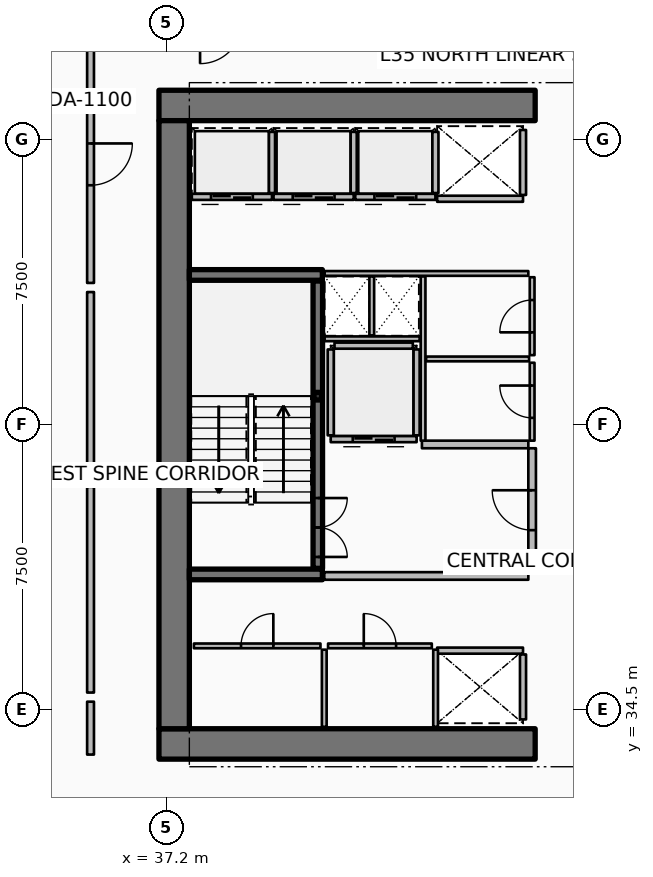
"""IFC4 building model, lengths in metres.
Left out: names, types, materials, properties, quantities, classifications, styles, units other than length and angle.
Written with IfcOpenShell. Run it as: python <this file> out.ifc"""

import sys

from ifc_helpers import new_model, si_unit, direction, frame, frame_2d, origin, origin_2d, place, context, subcontext, project, spatial, rectangle, hollow_rectangle, extrude, element, fill, save


model = new_model("IFC4")
c1 = context("Model", 3, precision=1e-05, world=origin(), true_north=direction((0.0, 1.0)))
c2 = subcontext(c1, "Body", "Model", "MODEL_VIEW")
j1 = project(units=[si_unit("LENGTHUNIT", "METRE"), si_unit("PLANEANGLEUNIT", "RADIAN")], contexts=[c1])
p1 = place(None, origin())
s1 = spatial("IfcSite", under=j1, at=p1, CompositionType="ELEMENT")
p2 = place(p1, origin())
s2 = spatial("IfcBuilding", under=s1, at=p2, CompositionType="ELEMENT")
p3 = place(p2, frame((0.0, 0.0, 142.8)))
s3 = spatial("IfcBuildingStorey", under=s2, at=p3, CompositionType="ELEMENT", Elevation=142.8)
for number, where, z_axis, x_axis in (
    (1, (37.0, 33.6, 0.0), (0.0, 0.0, 1.0), (1.0, 0.0, 0.0)),
    (2, (37.0, 50.4, 0.0), (0.0, 0.0, 1.0), (1.0, 0.0, 0.0)),
):
    element("IfcWall", number, at=place(p3, frame(where, z_axis=z_axis, x_axis=x_axis)), inside=s3, PredefinedType="SHEAR", context=c2, shape_type="SweptSolid", body=[
        extrude(rectangle(XDim=9.9, YDim=0.8, at=frame_2d((4.95, 0.0))), origin(), (0.0, 0.0, 1.0), 3.75),
    ])
p4 = place(p3, frame((37.4, 34.0, 0.0), z_axis=(0.0, 0.0, 1.0), x_axis=(0.0, 1.0, 0.0)))
e3 = element("IfcWall", 3, at=p4, inside=s3, PredefinedType="SHEAR", context=c2, shape_type="SweptSolid", body=[
    extrude(rectangle(XDim=16.0, YDim=0.8, at=frame_2d((8.0, 0.0))), origin(), (0.0, 0.0, 1.0), 3.75),
])
for number, where, z_axis, x_axis in (
    (4, (37.8, 38.06, 0.0), (0.0, 0.0, 1.0), (1.0, 0.0, 0.0)),
    (5, (37.8, 45.94, 0.0), (0.0, 0.0, 1.0), (1.0, 0.0, 0.0)),
):
    element("IfcWall", number, at=place(p3, frame(where, z_axis=z_axis, x_axis=x_axis)), inside=s3, PredefinedType="SHEAR", context=c2, shape_type="SweptSolid", body=[
        extrude(rectangle(XDim=3.5, YDim=0.28, at=frame_2d((1.75, 0.0))), origin(), (0.0, 0.0, 1.0), 3.75),
    ])
p5 = place(p3, frame((41.18, 42.75, 0.0), z_axis=(0.0, 0.0, 1.0), x_axis=(1.0, 0.0, 0.0)))
e6 = element("IfcColumn", 6, at=p5, inside=s3, PredefinedType="COLUMN", context=c2, shape_type="SweptSolid", body=[
    extrude(hollow_rectangle(XDim=0.2, YDim=0.2, WallThickness=0.01, InnerFilletRadius=0.01, OuterFilletRadius=0.02, at=origin_2d()), origin(), (0.0, 0.0, 1.0), 1.67),
])
p6 = place(p3, frame((41.18, 38.22, 0.0), z_axis=(0.0, 0.0, 1.0), x_axis=(0.0, 1.0, 0.0)))
e7 = element("IfcWall", 7, at=p6, inside=s3, PredefinedType="SOLIDWALL", context=c2, shape_type="SweptSolid", body=[
    extrude(rectangle(XDim=7.56, YDim=0.25, at=frame_2d((3.78, 0.0))), origin(), (0.0, 0.0, 1.0), 3.5),
])
p7 = place(p6, frame((0.3, 0.0, 0.0)))
e8 = element("IfcOpeningElement", 8, at=p7, cuts=e7, PredefinedType="OPENING", context=c2, shape_type="SweptSolid", body=[
    extrude(rectangle(XDim=1.55, YDim=2.15, at=frame_2d((0.775, 1.075))), frame((0.0, 0.135, 0.0), z_axis=(0.0, -1.0, 0.0), x_axis=(1.0, 0.0, 0.0)), (0.0, 0.0, 1.0), 0.27),
])
p8 = place(p3, frame((39.975, 47.995, 0.0), z_axis=(0.0, 0.0, 1.0), x_axis=(-1.0, 0.0, 0.0)))
e9 = element("IfcWall", 9, at=p8, inside=s3, PredefinedType="PARTITIONING", context=c2, shape_type="SweptSolid", body=[
    extrude(rectangle(XDim=2.11, YDim=0.16, at=frame_2d((1.055, 0.0))), origin(), (0.0, 0.0, 1.0), 3.5),
])
p9 = place(p8, frame((0.505, 0.0, 0.0)))
e10 = element("IfcOpeningElement", 10, at=p9, cuts=e9, PredefinedType="OPENING", context=c2, shape_type="SweptSolid", body=[
    extrude(rectangle(XDim=1.1, YDim=2.1, at=frame_2d((0.55, 1.05))), frame((0.0, 0.09, 0.0), z_axis=(0.0, -1.0, 0.0), x_axis=(1.0, 0.0, 0.0)), (0.0, 0.0, 1.0), 0.18),
])
p10 = place(p3, frame((39.975, 48.095, 0.0), z_axis=(0.0, 0.0, 1.0), x_axis=(0.0, 1.0, 0.0)))
e11 = element("IfcWall", 11, at=p10, inside=s3, PredefinedType="PARTITIONING", context=c2, shape_type="SweptSolid", body=[
    extrude(rectangle(XDim=1.61, YDim=0.16, at=frame_2d((0.805, 0.0))), origin(), (0.0, 0.0, 1.0), 3.5),
])
p11 = place(p3, frame((42.125, 47.995, 0.0), z_axis=(0.0, 0.0, 1.0), x_axis=(-1.0, 0.0, 0.0)))
e12 = element("IfcWall", 12, at=p11, inside=s3, PredefinedType="PARTITIONING", context=c2, shape_type="SweptSolid", body=[
    extrude(rectangle(XDim=2.11, YDim=0.16, at=frame_2d((1.055, 0.0))), origin(), (0.0, 0.0, 1.0), 3.5),
])
p12 = place(p11, frame((0.505, 0.0, 0.0)))
e13 = element("IfcOpeningElement", 13, at=p12, cuts=e12, PredefinedType="OPENING", context=c2, shape_type="SweptSolid", body=[
    extrude(rectangle(XDim=1.1, YDim=2.1, at=frame_2d((0.55, 1.05))), frame((0.0, 0.09, 0.0), z_axis=(0.0, -1.0, 0.0), x_axis=(1.0, 0.0, 0.0)), (0.0, 0.0, 1.0), 0.18),
])
p13 = place(p3, frame((42.125, 48.095, 0.0), z_axis=(0.0, 0.0, 1.0), x_axis=(0.0, 1.0, 0.0)))
e14 = element("IfcWall", 14, at=p13, inside=s3, PredefinedType="PARTITIONING", context=c2, shape_type="SweptSolid", body=[
    extrude(rectangle(XDim=1.61, YDim=0.16, at=frame_2d((0.805, 0.0))), origin(), (0.0, 0.0, 1.0), 3.5),
])
p14 = place(p3, frame((44.275, 47.995, 0.0), z_axis=(0.0, 0.0, 1.0), x_axis=(-1.0, 0.0, 0.0)))
e15 = element("IfcWall", 15, at=p14, inside=s3, PredefinedType="PARTITIONING", context=c2, shape_type="SweptSolid", body=[
    extrude(rectangle(XDim=2.11, YDim=0.16, at=frame_2d((1.055, 0.0))), origin(), (0.0, 0.0, 1.0), 3.5),
])
p15 = place(p14, frame((0.505, 0.0, 0.0)))
e16 = element("IfcOpeningElement", 16, at=p15, cuts=e15, PredefinedType="OPENING", context=c2, shape_type="SweptSolid", body=[
    extrude(rectangle(XDim=1.1, YDim=2.1, at=frame_2d((0.55, 1.05))), frame((0.0, 0.09, 0.0), z_axis=(0.0, -1.0, 0.0), x_axis=(1.0, 0.0, 0.0)), (0.0, 0.0, 1.0), 0.18),
])
p16 = place(p3, frame((44.275, 48.095, 0.0), z_axis=(0.0, 0.0, 1.0), x_axis=(0.0, 1.0, 0.0)))
e17 = element("IfcWall", 17, at=p16, inside=s3, PredefinedType="PARTITIONING", context=c2, shape_type="SweptSolid", body=[
    extrude(rectangle(XDim=1.61, YDim=0.16, at=frame_2d((0.805, 0.0))), origin(), (0.0, 0.0, 1.0), 3.5),
])
p17 = place(p3, frame((46.58, 47.945, 0.0), z_axis=(0.0, 0.0, 1.0), x_axis=(-1.0, 0.0, 0.0)))
e18 = element("IfcWall", 18, at=p17, inside=s3, PredefinedType="PARTITIONING", context=c2, shape_type="SweptSolid", body=[
    extrude(rectangle(XDim=2.26, YDim=0.16, at=frame_2d((1.13, 0.0))), origin(), (0.0, 0.0, 1.0), 3.5),
])
p18 = place(p3, frame((46.58, 48.045, 0.0), z_axis=(0.0, 0.0, 1.0), x_axis=(0.0, 1.0, 0.0)))
e19 = element("IfcWall", 19, at=p18, inside=s3, PredefinedType="PARTITIONING", context=c2, shape_type="SweptSolid", body=[
    extrude(rectangle(XDim=1.71, YDim=0.16, at=frame_2d((0.855, 0.0))), origin(), (0.0, 0.0, 1.0), 3.5),
])
p19 = place(p3, frame((44.32, 36.055, 0.0), z_axis=(0.0, 0.0, 1.0), x_axis=(1.0, 0.0, 0.0)))
e20 = element("IfcWall", 20, at=p19, inside=s3, PredefinedType="PARTITIONING", context=c2, shape_type="SweptSolid", body=[
    extrude(rectangle(XDim=2.26, YDim=0.16, at=frame_2d((1.13, 0.0))), origin(), (0.0, 0.0, 1.0), 3.5),
])
p20 = place(p3, frame((46.58, 34.245, 0.0), z_axis=(0.0, 0.0, 1.0), x_axis=(0.0, 1.0, 0.0)))
e21 = element("IfcWall", 21, at=p20, inside=s3, PredefinedType="PARTITIONING", context=c2, shape_type="SweptSolid", body=[
    extrude(rectangle(XDim=1.71, YDim=0.16, at=frame_2d((0.855, 0.0))), origin(), (0.0, 0.0, 1.0), 3.5),
])
p21 = place(p3, frame((43.78, 41.62, 0.0), z_axis=(0.0, 0.0, 1.0), x_axis=(-1.0, 0.0, 0.0)))
e22 = element("IfcWall", 22, at=p21, inside=s3, PredefinedType="PARTITIONING", context=c2, shape_type="SweptSolid", body=[
    extrude(rectangle(XDim=2.26, YDim=0.16, at=frame_2d((1.13, 0.0))), origin(), (0.0, 0.0, 1.0), 3.5),
])
p22 = place(p21, frame((0.58, 0.0, 0.0)))
e23 = element("IfcOpeningElement", 23, at=p22, cuts=e22, PredefinedType="OPENING", context=c2, shape_type="SweptSolid", body=[
    extrude(rectangle(XDim=1.1, YDim=2.1, at=frame_2d((0.55, 1.05))), frame((0.0, 0.09, 0.0), z_axis=(0.0, -1.0, 0.0), x_axis=(1.0, 0.0, 0.0)), (0.0, 0.0, 1.0), 0.18),
])
for number, where, z_axis, x_axis in (
    (24, (43.78, 41.72, 0.0), (0.0, 0.0, 1.0), (0.0, 1.0, 0.0)),
    (25, (41.52, 41.72, 0.0), (0.0, 0.0, 1.0), (0.0, 1.0, 0.0)),
):
    element("IfcWall", number, at=place(p3, frame(where, z_axis=z_axis, x_axis=x_axis)), inside=s3, PredefinedType="PARTITIONING", context=c2, shape_type="SweptSolid", body=[
        extrude(rectangle(XDim=2.26, YDim=0.16, at=frame_2d((1.13, 0.0))), origin(), (0.0, 0.0, 1.0), 3.5),
    ])
p23 = place(p3, frame((41.62, 44.08, 0.0), z_axis=(0.0, 0.0, 1.0), x_axis=(1.0, 0.0, 0.0)))
e26 = element("IfcWall", 26, at=p23, inside=s3, PredefinedType="PARTITIONING", context=c2, shape_type="SweptSolid", body=[
    extrude(rectangle(XDim=2.06, YDim=0.16, at=frame_2d((1.03, 0.0))), origin(), (0.0, 0.0, 1.0), 3.5),
])
for number, where, z_axis, x_axis in (
    (27, (44.28, 34.05, 0.0), (0.0, 0.0, 1.0), (0.0, 1.0, 0.0)),
    (28, (41.35, 34.05, 0.0), (0.0, 0.0, 1.0), (0.0, 1.0, 0.0)),
):
    element("IfcWall", number, at=place(p3, frame(where, z_axis=z_axis, x_axis=x_axis)), inside=s3, PredefinedType="PARTITIONING", context=c2, shape_type="SweptSolid", body=[
        extrude(rectangle(XDim=2.03, YDim=0.125, at=frame_2d((1.015, 0.0))), origin(), (0.0, 0.0, 1.0), 2.94),
    ])
p24 = place(p3, frame((37.92, 36.18, 0.0), z_axis=(0.0, 0.0, 1.0), x_axis=(1.0, 0.0, 0.0)))
e29 = element("IfcWall", 29, at=p24, inside=s3, PredefinedType="PARTITIONING", context=c2, shape_type="SweptSolid", body=[
    extrude(rectangle(XDim=3.33, YDim=0.125, at=frame_2d((1.665, 0.0))), origin(), (0.0, 0.0, 1.0), 2.94),
])
p25 = place(p24, frame((1.24, 0.0, 0.0)))
e30 = element("IfcOpeningElement", 30, at=p25, cuts=e29, PredefinedType="OPENING", context=c2, shape_type="SweptSolid", body=[
    extrude(rectangle(XDim=0.85, YDim=2.06, at=frame_2d((0.425, 1.03))), frame((0.0, 0.073, 0.0), z_axis=(0.0, -1.0, 0.0), x_axis=(1.0, 0.0, 0.0)), (0.0, 0.0, 1.0), 0.145),
])
p26 = place(p3, frame((41.45, 36.18, 0.0), z_axis=(0.0, 0.0, 1.0), x_axis=(1.0, 0.0, 0.0)))
e31 = element("IfcWall", 31, at=p26, inside=s3, PredefinedType="PARTITIONING", context=c2, shape_type="SweptSolid", body=[
    extrude(rectangle(XDim=2.73, YDim=0.125, at=frame_2d((1.365, 0.0))), origin(), (0.0, 0.0, 1.0), 2.94),
])
p27 = place(p26, frame((0.94, 0.0, 0.0)))
e32 = element("IfcOpeningElement", 32, at=p27, cuts=e31, PredefinedType="OPENING", context=c2, shape_type="SweptSolid", body=[
    extrude(rectangle(XDim=0.85, YDim=2.06, at=frame_2d((0.425, 1.03))), frame((0.0, 0.073, 0.0), z_axis=(0.0, -1.0, 0.0), x_axis=(1.0, 0.0, 0.0)), (0.0, 0.0, 1.0), 0.145),
])
p28 = place(p3, frame((41.35, 38.02, 0.0), z_axis=(0.0, 0.0, 1.0), x_axis=(1.0, 0.0, 0.0)))
e33 = element("IfcWall", 33, at=p28, inside=s3, PredefinedType="PARTITIONING", context=c2, shape_type="SweptSolid", body=[
    extrude(rectangle(XDim=5.37, YDim=0.2, at=frame_2d((2.685, 0.0))), origin(), (0.0, 0.0, 1.0), 3.5),
])
p29 = place(p3, frame((43.92, 41.48, 0.0), z_axis=(0.0, 0.0, 1.0), x_axis=(1.0, 0.0, 0.0)))
e34 = element("IfcWall", 34, at=p29, inside=s3, PredefinedType="PARTITIONING", context=c2, shape_type="SweptSolid", body=[
    extrude(rectangle(XDim=2.8, YDim=0.2, at=frame_2d((1.4, 0.0))), origin(), (0.0, 0.0, 1.0), 3.5),
])
p30 = place(p3, frame((46.82, 38.12, 0.0), z_axis=(0.0, 0.0, 1.0), x_axis=(0.0, 1.0, 0.0)))
e35 = element("IfcWall", 35, at=p30, inside=s3, PredefinedType="PARTITIONING", context=c2, shape_type="SweptSolid", body=[
    extrude(rectangle(XDim=3.26, YDim=0.2, at=frame_2d((1.63, 0.0))), origin(), (0.0, 0.0, 1.0), 3.5),
])
p31 = place(p30, frame((1.105, 0.0, 0.0)))
e36 = element("IfcOpeningElement", 36, at=p31, cuts=e35, PredefinedType="OPENING", context=c2, shape_type="SweptSolid", body=[
    extrude(rectangle(XDim=1.05, YDim=2.1, at=frame_2d((0.525, 1.05))), frame((0.0, 0.11, 0.0), z_axis=(0.0, -1.0, 0.0), x_axis=(1.0, 0.0, 0.0)), (0.0, 0.0, 1.0), 0.22),
])
p32 = place(p3, frame((41.36, 45.98, 0.0), z_axis=(0.0, 0.0, 1.0), x_axis=(1.0, 0.0, 0.0)))
e37 = element("IfcWall", 37, at=p32, inside=s3, PredefinedType="PARTITIONING", context=c2, shape_type="SweptSolid", body=[
    extrude(rectangle(XDim=5.36, YDim=0.125, at=frame_2d((2.68, 0.0))), origin(), (0.0, 0.0, 1.0), 2.94),
])
p33 = place(p3, frame((41.36, 44.26, 0.0), z_axis=(0.0, 0.0, 1.0), x_axis=(1.0, 0.0, 0.0)))
e38 = element("IfcWall", 38, at=p33, inside=s3, PredefinedType="PARTITIONING", context=c2, shape_type="SweptSolid", body=[
    extrude(rectangle(XDim=2.5, YDim=0.125, at=frame_2d((1.25, 0.0))), origin(), (0.0, 0.0, 1.0), 2.94),
])
p34 = place(p3, frame((42.6, 44.35, 0.0), z_axis=(0.0, 0.0, 1.0), x_axis=(0.0, 1.0, 0.0)))
e39 = element("IfcWall", 39, at=p34, inside=s3, PredefinedType="PARTITIONING", context=c2, shape_type="SweptSolid", body=[
    extrude(rectangle(XDim=1.55, YDim=0.125, at=frame_2d((0.775, 0.0))), origin(), (0.0, 0.0, 1.0), 2.94),
])
p35 = place(p3, frame((43.95, 41.58, 0.0), z_axis=(0.0, 0.0, 1.0), x_axis=(0.0, 1.0, 0.0)))
e40 = element("IfcWall", 40, at=p35, inside=s3, PredefinedType="PARTITIONING", context=c2, shape_type="SweptSolid", body=[
    extrude(rectangle(XDim=4.32, YDim=0.125, at=frame_2d((2.16, 0.0))), origin(), (0.0, 0.0, 1.0), 2.94),
])
p36 = place(p3, frame((44.03, 43.73, 0.0), z_axis=(0.0, 0.0, 1.0), x_axis=(1.0, 0.0, 0.0)))
e41 = element("IfcWall", 41, at=p36, inside=s3, PredefinedType="PARTITIONING", context=c2, shape_type="SweptSolid", body=[
    extrude(rectangle(XDim=2.71, YDim=0.125, at=frame_2d((1.355, 0.0))), origin(), (0.0, 0.0, 1.0), 2.94),
])
p37 = place(p3, frame((46.82, 41.58, 0.0), z_axis=(0.0, 0.0, 1.0), x_axis=(0.0, 1.0, 0.0)))
e42 = element("IfcWall", 42, at=p37, inside=s3, PredefinedType="PARTITIONING", context=c2, shape_type="SweptSolid", body=[
    extrude(rectangle(XDim=2.05, YDim=0.125, at=frame_2d((1.025, 0.0))), origin(), (0.0, 0.0, 1.0), 2.94),
])
p38 = place(p37, frame((0.6, 0.0, 0.0)))
e43 = element("IfcOpeningElement", 43, at=p38, cuts=e42, PredefinedType="OPENING", context=c2, shape_type="SweptSolid", body=[
    extrude(rectangle(XDim=0.85, YDim=2.06, at=frame_2d((0.425, 1.03))), frame((0.0, 0.073, 0.0), z_axis=(0.0, -1.0, 0.0), x_axis=(1.0, 0.0, 0.0)), (0.0, 0.0, 1.0), 0.145),
])
p39 = place(p3, frame((46.82, 43.83, 0.0), z_axis=(0.0, 0.0, 1.0), x_axis=(0.0, 1.0, 0.0)))
e44 = element("IfcWall", 44, at=p39, inside=s3, PredefinedType="PARTITIONING", context=c2, shape_type="SweptSolid", body=[
    extrude(rectangle(XDim=2.05, YDim=0.125, at=frame_2d((1.025, 0.0))), origin(), (0.0, 0.0, 1.0), 2.94),
])
p40 = place(p39, frame((0.6, 0.0, 0.0)))
e45 = element("IfcOpeningElement", 45, at=p40, cuts=e44, PredefinedType="OPENING", context=c2, shape_type="SweptSolid", body=[
    extrude(rectangle(XDim=0.85, YDim=2.06, at=frame_2d((0.425, 1.03))), frame((0.0, 0.073, 0.0), z_axis=(0.0, -1.0, 0.0), x_axis=(1.0, 0.0, 0.0)), (0.0, 0.0, 1.0), 0.145),
])
p41 = place(p3, frame((35.2, 51.971, 0.0), z_axis=(0.0, 0.0, 1.0), x_axis=(0.0, -1.0, 0.0)))
e46 = element("IfcWall", 46, at=p41, inside=s3, PredefinedType="PARTITIONING", context=c2, shape_type="SweptSolid", body=[
    extrude(rectangle(XDim=6.241, YDim=0.18, at=frame_2d((3.12, 0.0))), origin(), (0.0, 0.0, 1.0), 2.94),
])
p42 = place(p41, frame((2.57, 0.0, 0.0)))
e47 = element("IfcOpeningElement", 47, at=p42, cuts=e46, PredefinedType="OPENING", context=c2, shape_type="SweptSolid", body=[
    extrude(rectangle(XDim=1.1, YDim=2.1, at=frame_2d((0.55, 1.05))), frame((0.0, 0.1, 0.0), z_axis=(0.0, -1.0, 0.0), x_axis=(1.0, 0.0, 0.0)), (0.0, 0.0, 1.0), 0.2),
])
p43 = place(p3, frame((35.2, 45.49, 0.0), z_axis=(0.0, 0.0, 1.0), x_axis=(0.0, -1.0, 0.0)))
e48 = element("IfcWall", 48, at=p43, inside=s3, PredefinedType="PARTITIONING", context=c2, shape_type="SweptSolid", body=[
    extrude(rectangle(XDim=4.885, YDim=0.18, at=frame_2d((2.442, 0.0))), origin(), (0.0, 0.0, 1.0), 2.94),
])
p44 = place(p3, frame((35.2, 40.365, 0.0), z_axis=(0.0, 0.0, 1.0), x_axis=(0.0, -1.0, 0.0)))
e49 = element("IfcWall", 49, at=p44, inside=s3, PredefinedType="PARTITIONING", context=c2, shape_type="SweptSolid", body=[
    extrude(rectangle(XDim=5.413, YDim=0.18, at=frame_2d((2.707, 0.0))), origin(), (0.0, 0.0, 1.0), 2.94),
])
p45 = place(p3, frame((35.2, 34.712, 0.0), z_axis=(0.0, 0.0, 1.0), x_axis=(0.0, -1.0, 0.0)))
e50 = element("IfcWall", 50, at=p45, inside=s3, PredefinedType="PARTITIONING", context=c2, shape_type="SweptSolid", body=[
    extrude(rectangle(XDim=1.392, YDim=0.18, at=frame_2d((0.696, 0.0))), origin(), (0.0, 0.0, 1.0), 2.94),
])
p46 = place(p3, frame((32.263, 33.063, 0.0), z_axis=(0.0, 0.0, 1.0), x_axis=(0.649448927448, -0.760405214762, 0.0)))
e51 = element("IfcWall", 51, at=p46, inside=s3, PredefinedType="PARTITIONING", context=c2, shape_type="SweptSolid", body=[
    extrude(rectangle(XDim=6.85, YDim=0.125, at=frame_2d((3.425, 0.0))), origin(), (0.0, 0.0, 1.0), 2.94),
])
p47 = place(p46, frame((2.975, 0.0, 0.0)))
e52 = element("IfcOpeningElement", 52, at=p47, cuts=e51, PredefinedType="OPENING", context=c2, shape_type="SweptSolid", body=[
    extrude(rectangle(XDim=0.9, YDim=2.08, at=frame_2d((0.45, 1.04))), frame((0.0, 0.073, 0.0), z_axis=(0.0, -1.0, 0.0), x_axis=(1.0, 0.0, 0.0)), (0.0, 0.0, 1.0), 0.145),
])
p48 = place(p7, origin())
e53 = element("IfcDoor", 53, at=p48, inside=s3, OperationType="DOUBLE_DOOR_SINGLE_SWING", PredefinedType="DOOR", context=c2, shape_type="SweptSolid", body=[
    extrude(rectangle(XDim=1.55, YDim=2.15, at=frame_2d((0.775, 1.075))), frame((0.0, 0.025, 0.0), z_axis=(0.0, -1.0, 0.0), x_axis=(1.0, 0.0, 0.0)), (0.0, 0.0, 1.0), 0.05),
])
fill(e8, e53)
p49 = place(p9, origin())
e54 = element("IfcDoor", 54, at=p49, inside=s3, OperationType="DOUBLE_DOOR_SLIDING", PredefinedType="DOOR", context=c2, shape_type="SweptSolid", body=[
    extrude(rectangle(XDim=1.1, YDim=2.1, at=frame_2d((0.55, 1.05))), frame((0.0, 0.025, 0.0), z_axis=(0.0, -1.0, 0.0), x_axis=(1.0, 0.0, 0.0)), (0.0, 0.0, 1.0), 0.05),
])
fill(e10, e54)
p50 = place(p12, origin())
e55 = element("IfcDoor", 55, at=p50, inside=s3, OperationType="DOUBLE_DOOR_SLIDING", PredefinedType="DOOR", context=c2, shape_type="SweptSolid", body=[
    extrude(rectangle(XDim=1.1, YDim=2.1, at=frame_2d((0.55, 1.05))), frame((0.0, 0.025, 0.0), z_axis=(0.0, -1.0, 0.0), x_axis=(1.0, 0.0, 0.0)), (0.0, 0.0, 1.0), 0.05),
])
fill(e13, e55)
p51 = place(p15, origin())
e56 = element("IfcDoor", 56, at=p51, inside=s3, OperationType="DOUBLE_DOOR_SLIDING", PredefinedType="DOOR", context=c2, shape_type="SweptSolid", body=[
    extrude(rectangle(XDim=1.1, YDim=2.1, at=frame_2d((0.55, 1.05))), frame((0.0, 0.025, 0.0), z_axis=(0.0, -1.0, 0.0), x_axis=(1.0, 0.0, 0.0)), (0.0, 0.0, 1.0), 0.05),
])
fill(e16, e56)
p52 = place(p22, origin())
e57 = element("IfcDoor", 57, at=p52, inside=s3, OperationType="DOUBLE_DOOR_SLIDING", PredefinedType="DOOR", context=c2, shape_type="SweptSolid", body=[
    extrude(rectangle(XDim=1.1, YDim=2.1, at=frame_2d((0.55, 1.05))), frame((0.0, 0.025, 0.0), z_axis=(0.0, -1.0, 0.0), x_axis=(1.0, 0.0, 0.0)), (0.0, 0.0, 1.0), 0.05),
])
fill(e23, e57)
p53 = place(p25, origin())
e58 = element("IfcDoor", 58, at=p53, inside=s3, OperationType="SINGLE_SWING_RIGHT", PredefinedType="DOOR", context=c2, shape_type="SweptSolid", body=[
    extrude(rectangle(XDim=0.85, YDim=2.06, at=frame_2d((0.425, 1.03))), frame((0.0, 0.025, 0.0), z_axis=(0.0, -1.0, 0.0), x_axis=(1.0, 0.0, 0.0)), (0.0, 0.0, 1.0), 0.05),
])
fill(e30, e58)
p54 = place(p27, origin())
e59 = element("IfcDoor", 59, at=p54, inside=s3, OperationType="SINGLE_SWING_LEFT", PredefinedType="DOOR", context=c2, shape_type="SweptSolid", body=[
    extrude(rectangle(XDim=0.85, YDim=2.06, at=frame_2d((0.425, 1.03))), frame((0.0, 0.025, 0.0), z_axis=(0.0, -1.0, 0.0), x_axis=(1.0, 0.0, 0.0)), (0.0, 0.0, 1.0), 0.05),
])
fill(e32, e59)
p55 = place(p31, origin())
e60 = element("IfcDoor", 60, at=p55, inside=s3, OperationType="SINGLE_SWING_RIGHT", PredefinedType="DOOR", context=c2, shape_type="SweptSolid", body=[
    extrude(rectangle(XDim=1.05, YDim=2.1, at=frame_2d((0.525, 1.05))), frame((0.0, 0.025, 0.0), z_axis=(0.0, -1.0, 0.0), x_axis=(1.0, 0.0, 0.0)), (0.0, 0.0, 1.0), 0.05),
])
fill(e36, e60)
p56 = place(p38, origin())
e61 = element("IfcDoor", 61, at=p56, inside=s3, OperationType="SINGLE_SWING_RIGHT", PredefinedType="DOOR", context=c2, shape_type="SweptSolid", body=[
    extrude(rectangle(XDim=0.85, YDim=2.06, at=frame_2d((0.425, 1.03))), frame((0.0, 0.025, 0.0), z_axis=(0.0, -1.0, 0.0), x_axis=(1.0, 0.0, 0.0)), (0.0, 0.0, 1.0), 0.05),
])
fill(e43, e61)
p57 = place(p40, origin())
e62 = element("IfcDoor", 62, at=p57, inside=s3, OperationType="SINGLE_SWING_LEFT", PredefinedType="DOOR", context=c2, shape_type="SweptSolid", body=[
    extrude(rectangle(XDim=0.85, YDim=2.06, at=frame_2d((0.425, 1.03))), frame((0.0, 0.025, 0.0), z_axis=(0.0, -1.0, 0.0), x_axis=(1.0, 0.0, 0.0)), (0.0, 0.0, 1.0), 0.05),
])
fill(e45, e62)
p58 = place(p42, origin())
e63 = element("IfcDoor", 63, at=p58, inside=s3, OperationType="SINGLE_SWING_LEFT", PredefinedType="DOOR", context=c2, shape_type="SweptSolid", body=[
    extrude(rectangle(XDim=1.1, YDim=2.1, at=frame_2d((0.55, 1.05))), frame((0.0, 0.025, 0.0), z_axis=(0.0, -1.0, 0.0), x_axis=(1.0, 0.0, 0.0)), (0.0, 0.0, 1.0), 0.05),
])
fill(e47, e63)
save(model, sys.argv[1])
